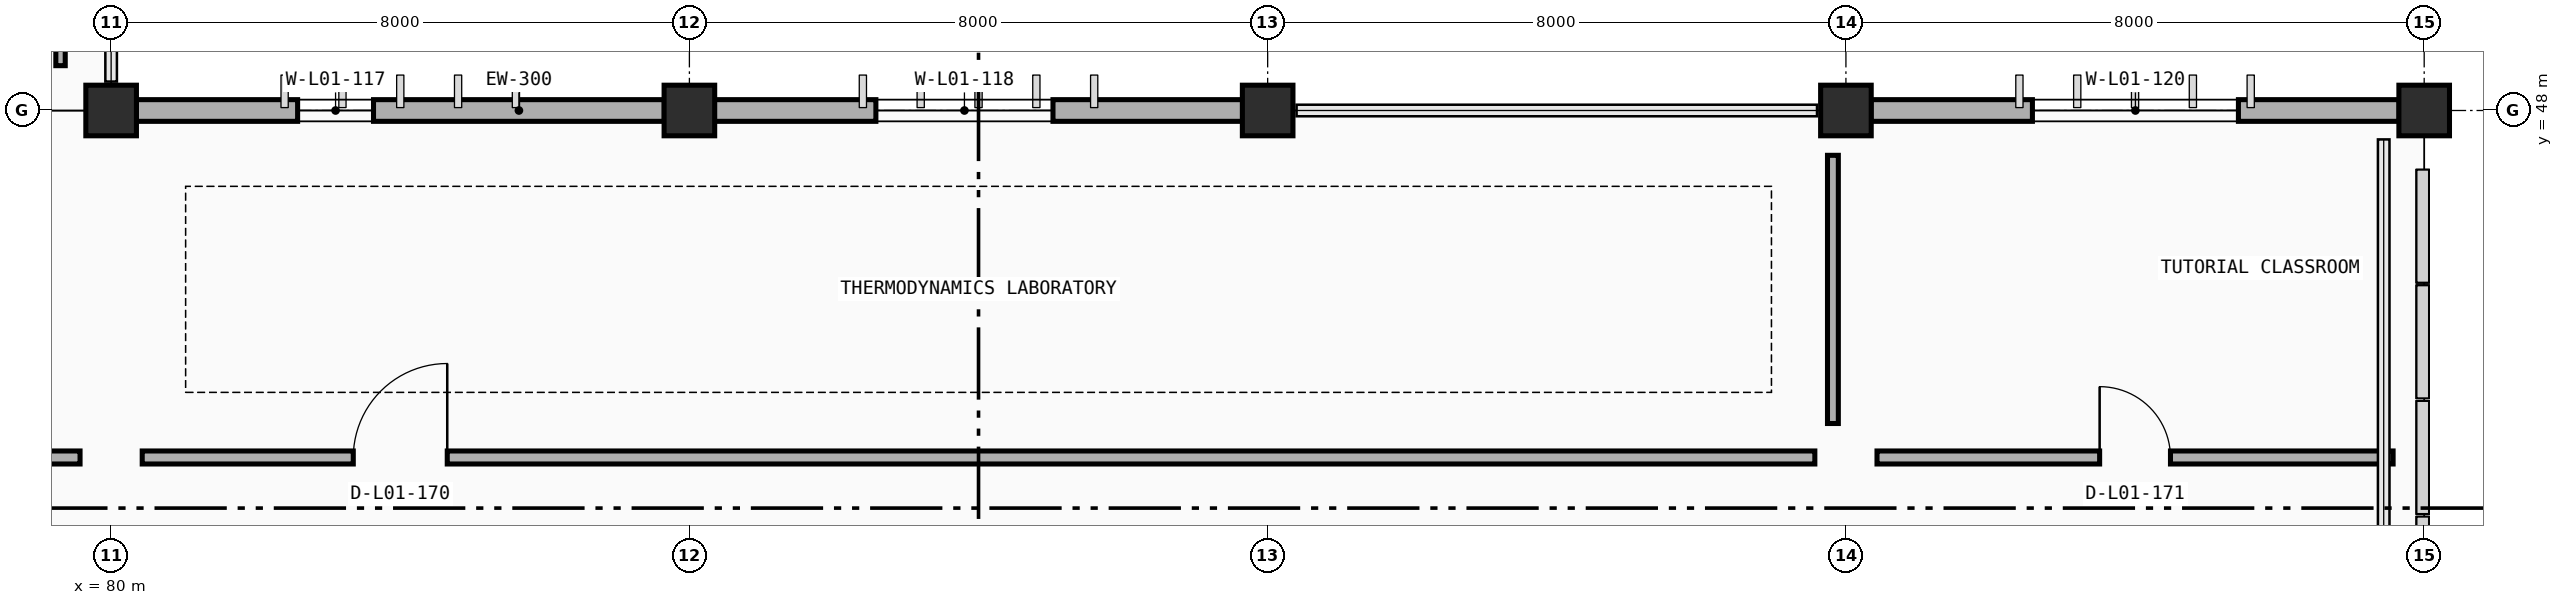
"""IFC4 building model, lengths in metres.
Left out: names, types, materials, properties, quantities, classifications, styles, units other than length and angle.
Written with IfcOpenShell. Run it as: python <this file> out.ifc"""

import sys

from ifc_helpers import new_model, si_unit, direction, frame, frame_2d, origin, origin_2d, place, context, subcontext, project, spatial, rectangle, extrude, element, fill, save


model = new_model("IFC4")
c1 = context("Model", 3, precision=1e-05, world=origin(), true_north=direction((0.0, 1.0)))
c2 = subcontext(c1, "Body", "Model", "MODEL_VIEW")
j1 = project(units=[si_unit("LENGTHUNIT", "METRE"), si_unit("PLANEANGLEUNIT", "RADIAN")], contexts=[c1])
p1 = place(None, origin())
s1 = spatial("IfcSite", under=j1, at=p1, CompositionType="ELEMENT")
p2 = place(p1, origin())
s2 = spatial("IfcBuilding", under=s1, at=p2, CompositionType="ELEMENT")
p3 = place(p2, origin())
s3 = spatial("IfcBuildingStorey", under=s2, at=p3, CompositionType="ELEMENT", Elevation=0.0)
for number, where, z_axis, x_axis in (
    (1, (80.0, 48.0, 0.0), (0.0, 0.0, 1.0), (1.0, 0.0, 0.0)),
    (2, (88.0, 48.0, 0.0), (0.0, 0.0, 1.0), (1.0, 0.0, 0.0)),
    (3, (96.0, 48.0, 0.0), (0.0, 0.0, 1.0), (1.0, 0.0, 0.0)),
    (4, (104.0, 48.0, 0.0), (0.0, 0.0, 1.0), (1.0, 0.0, 0.0)),
    (5, (112.0, 48.0, 0.0), (0.0, 0.0, 1.0), (1.0, 0.0, 0.0)),
):
    element("IfcColumn", number, at=place(p3, frame(where, z_axis=z_axis, x_axis=x_axis)), inside=s3, PredefinedType="COLUMN", context=c2, shape_type="SweptSolid", body=[
        extrude(rectangle(XDim=0.7, YDim=0.7, at=origin_2d()), origin(), (0.0, 0.0, 1.0), 4.8),
    ])
p4 = place(p3, frame((80.347, 48.0, 0.0), z_axis=(0.0, 0.0, 1.0), x_axis=(1.0, 0.0, 0.0)))
e6 = element("IfcWall", 6, at=p4, inside=s3, PredefinedType="STANDARD", context=c2, shape_type="SweptSolid", body=[
    extrude(rectangle(XDim=7.306, YDim=0.3, at=frame_2d((3.653, 0.0))), origin(), (0.0, 0.0, 1.0), 3.91),
])
p5 = place(p4, frame((2.233, 0.0, 0.9)))
e7 = element("IfcOpeningElement", 7, at=p5, cuts=e6, PredefinedType="OPENING", context=c2, shape_type="SweptSolid", body=[
    extrude(rectangle(XDim=1.05, YDim=1.55, at=frame_2d((0.525, 0.775))), frame((0.0, 0.16, 0.0), z_axis=(0.0, -1.0, 0.0), x_axis=(1.0, 0.0, 0.0)), (0.0, 0.0, 1.0), 0.32),
])
p6 = place(p3, frame((88.347, 48.0, 0.0), z_axis=(0.0, 0.0, 1.0), x_axis=(1.0, 0.0, 0.0)))
e8 = element("IfcWall", 8, at=p6, inside=s3, PredefinedType="STANDARD", context=c2, shape_type="SweptSolid", body=[
    extrude(rectangle(XDim=7.306, YDim=0.3, at=frame_2d((3.653, 0.0))), origin(), (0.0, 0.0, 1.0), 3.91),
])
p7 = place(p6, frame((2.233, 0.0, 0.9)))
e9 = element("IfcOpeningElement", 9, at=p7, cuts=e8, PredefinedType="OPENING", context=c2, shape_type="SweptSolid", body=[
    extrude(rectangle(XDim=2.45, YDim=1.4, at=frame_2d((1.225, 0.7))), frame((0.0, 0.16, 0.0), z_axis=(0.0, -1.0, 0.0), x_axis=(1.0, 0.0, 0.0)), (0.0, 0.0, 1.0), 0.32),
])
p8 = place(p3, frame((104.347, 48.0, 0.0), z_axis=(0.0, 0.0, 1.0), x_axis=(1.0, 0.0, 0.0)))
e10 = element("IfcWall", 10, at=p8, inside=s3, PredefinedType="STANDARD", context=c2, shape_type="SweptSolid", body=[
    extrude(rectangle(XDim=7.306, YDim=0.3, at=frame_2d((3.653, 0.0))), origin(), (0.0, 0.0, 1.0), 3.91),
])
p9 = place(p8, frame((2.233, 0.0, 0.9)))
e11 = element("IfcOpeningElement", 11, at=p9, cuts=e10, PredefinedType="OPENING", context=c2, shape_type="SweptSolid", body=[
    extrude(rectangle(XDim=2.85, YDim=1.4, at=frame_2d((1.425, 0.7))), frame((0.0, 0.16, 0.0), z_axis=(0.0, -1.0, 0.0), x_axis=(1.0, 0.0, 0.0)), (0.0, 0.0, 1.0), 0.32),
])
p10 = place(p3, frame((111.76, 47.78, 0.0), z_axis=(0.0, 0.0, 1.0), x_axis=(-1.0, 0.0, 0.0)))
e12 = element("IfcWall", 12, at=p10, inside=s3, PredefinedType="PARAPET", context=c2, shape_type="SweptSolid", body=[
    extrude(rectangle(XDim=0.32, YDim=0.2, at=frame_2d((0.16, 0.0))), origin(), (0.0, 0.0, 1.0), 3.95),
])
p11 = place(p3, frame((56.43, 43.2, 0.0), z_axis=(0.0, 0.0, 1.0), x_axis=(1.0, 0.0, 0.0)))
e13 = element("IfcWall", 13, at=p11, inside=s3, PredefinedType="PARTITIONING", context=c2, shape_type="SweptSolid", body=[
    extrude(rectangle(XDim=23.14, YDim=0.18, at=frame_2d((11.57, 0.0))), origin(), (0.0, 0.0, 1.0), 3.9),
])
p12 = place(p11, frame((2.96, 0.0, 0.0)))
e14 = element("IfcOpeningElement", 14, at=p12, cuts=e13, PredefinedType="OPENING", context=c2, shape_type="SweptSolid", body=[
    extrude(rectangle(XDim=1.22, YDim=2.18, at=frame_2d((0.61, 1.09))), frame((0.0, 0.1, 0.0), z_axis=(0.0, -1.0, 0.0), x_axis=(1.0, 0.0, 0.0)), (0.0, 0.0, 1.0), 0.2),
])
p13 = place(p3, frame((80.43, 43.2, 0.0), z_axis=(0.0, 0.0, 1.0), x_axis=(1.0, 0.0, 0.0)))
e15 = element("IfcWall", 15, at=p13, inside=s3, PredefinedType="PARTITIONING", context=c2, shape_type="SweptSolid", body=[
    extrude(rectangle(XDim=23.14, YDim=0.18, at=frame_2d((11.57, 0.0))), origin(), (0.0, 0.0, 1.0), 3.9),
])
p14 = place(p13, frame((2.92, 0.0, 0.0)))
e16 = element("IfcOpeningElement", 16, at=p14, cuts=e15, PredefinedType="OPENING", context=c2, shape_type="SweptSolid", body=[
    extrude(rectangle(XDim=1.3, YDim=2.18, at=frame_2d((0.65, 1.09))), frame((0.0, 0.1, 0.0), z_axis=(0.0, -1.0, 0.0), x_axis=(1.0, 0.0, 0.0)), (0.0, 0.0, 1.0), 0.2),
])
p15 = place(p3, frame((103.82, 43.67, 0.0), z_axis=(0.0, 0.0, 1.0), x_axis=(0.0, 1.0, 0.0)))
e17 = element("IfcWall", 17, at=p15, inside=s3, PredefinedType="PARTITIONING", context=c2, shape_type="SweptSolid", body=[
    extrude(rectangle(XDim=3.71, YDim=0.15, at=frame_2d((1.855, 0.0))), origin(), (0.0, 0.0, 1.0), 3.76),
])
p16 = place(p3, frame((104.43, 43.2, 0.0), z_axis=(0.0, 0.0, 1.0), x_axis=(1.0, 0.0, 0.0)))
e18 = element("IfcWall", 18, at=p16, inside=s3, PredefinedType="PARTITIONING", context=c2, shape_type="SweptSolid", body=[
    extrude(rectangle(XDim=7.14, YDim=0.18, at=frame_2d((3.57, 0.0))), origin(), (0.0, 0.0, 1.0), 3.9),
])
p17 = place(p16, frame((3.08, 0.0, 0.0)))
e19 = element("IfcOpeningElement", 19, at=p17, cuts=e18, PredefinedType="OPENING", context=c2, shape_type="SweptSolid", body=[
    extrude(rectangle(XDim=0.98, YDim=2.1, at=frame_2d((0.49, 1.05))), frame((0.0, 0.1, 0.0), z_axis=(0.0, -1.0, 0.0), x_axis=(1.0, 0.0, 0.0)), (0.0, 0.0, 1.0), 0.2),
])
p18 = place(p3, frame((79.3, 48.62, 0.0), z_axis=(0.0, 0.0, 1.0), x_axis=(0.0, 1.0, 0.0)))
e20 = element("IfcWall", 20, at=p18, inside=s3, PredefinedType="MOVABLE", context=c2, shape_type="SweptSolid", body=[
    extrude(rectangle(XDim=6.76, YDim=0.13, at=frame_2d((3.38, 0.0))), origin(), (0.0, 0.0, 1.0), 3.9),
])
p19 = place(p5, origin())
e21 = element("IfcWindow", 21, at=p19, inside=s3, PartitioningType="SINGLE_PANEL", PredefinedType="WINDOW", context=c2, shape_type="SweptSolid", body=[
    extrude(rectangle(XDim=1.05, YDim=1.55, at=frame_2d((0.525, 0.775))), frame((0.0, 0.03, 0.0), z_axis=(0.0, -1.0, 0.0), x_axis=(1.0, 0.0, 0.0)), (0.0, 0.0, 1.0), 0.06),
])
fill(e7, e21)
p20 = place(p7, origin())
e22 = element("IfcWindow", 22, at=p20, inside=s3, PartitioningType="DOUBLE_PANEL_VERTICAL", PredefinedType="WINDOW", context=c2, shape_type="SweptSolid", body=[
    extrude(rectangle(XDim=2.45, YDim=1.4, at=frame_2d((1.225, 0.7))), frame((0.0, 0.03, 0.0), z_axis=(0.0, -1.0, 0.0), x_axis=(1.0, 0.0, 0.0)), (0.0, 0.0, 1.0), 0.06),
])
fill(e9, e22)
p21 = place(p9, origin())
e23 = element("IfcWindow", 23, at=p21, inside=s3, PartitioningType="DOUBLE_PANEL_VERTICAL", PredefinedType="WINDOW", context=c2, shape_type="SweptSolid", body=[
    extrude(rectangle(XDim=2.85, YDim=1.4, at=frame_2d((1.425, 0.7))), frame((0.0, 0.03, 0.0), z_axis=(0.0, -1.0, 0.0), x_axis=(1.0, 0.0, 0.0)), (0.0, 0.0, 1.0), 0.06),
])
fill(e11, e23)
p22 = place(p14, origin())
e24 = element("IfcDoor", 24, at=p22, inside=s3, OperationType="SINGLE_SWING_RIGHT", PredefinedType="DOOR", context=c2, shape_type="SweptSolid", body=[
    extrude(rectangle(XDim=1.3, YDim=2.18, at=frame_2d((0.65, 1.09))), frame((0.0, 0.025, 0.0), z_axis=(0.0, -1.0, 0.0), x_axis=(1.0, 0.0, 0.0)), (0.0, 0.0, 1.0), 0.05),
])
fill(e16, e24)
p23 = place(p17, origin())
e25 = element("IfcDoor", 25, at=p23, inside=s3, OperationType="SINGLE_SWING_LEFT", PredefinedType="DOOR", context=c2, shape_type="SweptSolid", body=[
    extrude(rectangle(XDim=0.98, YDim=2.1, at=frame_2d((0.49, 1.05))), frame((0.0, 0.025, 0.0), z_axis=(0.0, -1.0, 0.0), x_axis=(1.0, 0.0, 0.0)), (0.0, 0.0, 1.0), 0.05),
])
fill(e19, e25)
save(model, sys.argv[1])
